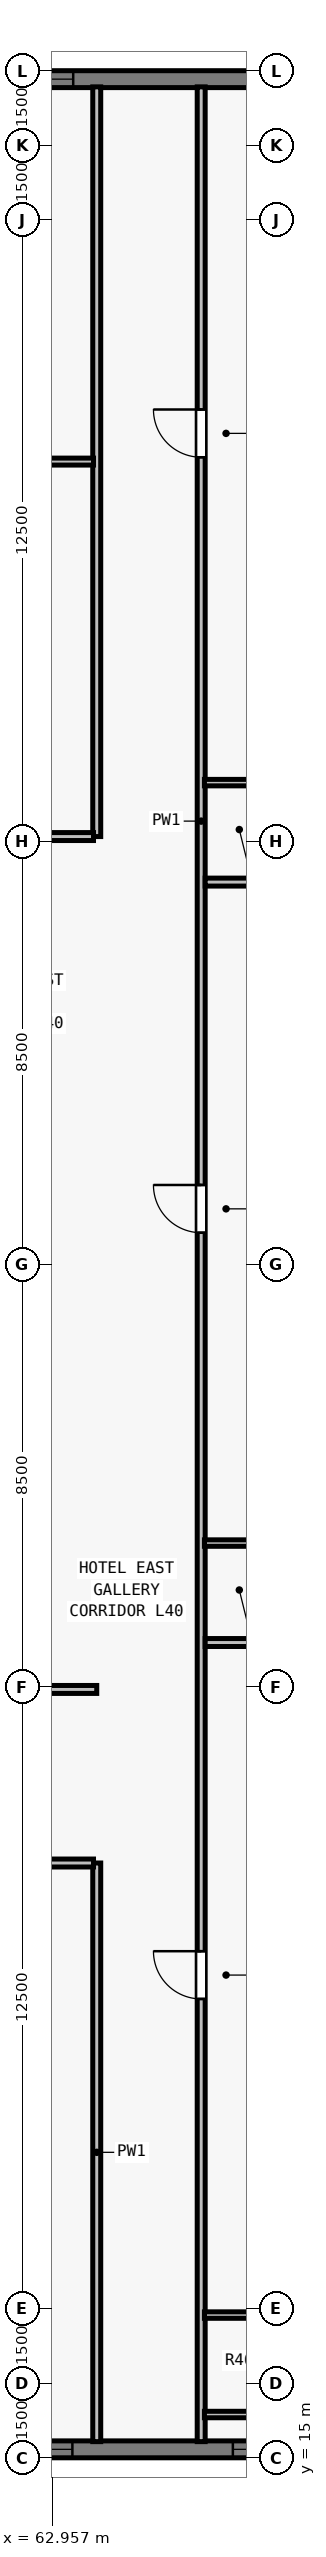
"""IFC4 building model, lengths in metres.
Left out: names, types, materials, properties, quantities, classifications, styles, units other than length and angle.
Written with IfcOpenShell. Run it as: python <this file> out.ifc"""

import sys

from ifc_helpers import new_model, si_unit, direction, frame, frame_2d, origin, place, context, subcontext, project, spatial, rectangle, extrude, element, fill, save


model = new_model("IFC4")
c1 = context("Model", 3, precision=1e-05, world=origin(), true_north=direction((0.0, 1.0)))
c2 = subcontext(c1, "Body", "Model", "MODEL_VIEW")
j1 = project(units=[si_unit("LENGTHUNIT", "METRE"), si_unit("PLANEANGLEUNIT", "RADIAN")], contexts=[c1])
p1 = place(None, origin())
s1 = spatial("IfcSite", under=j1, at=p1, CompositionType="ELEMENT")
p2 = place(p1, origin())
s2 = spatial("IfcBuilding", under=s1, at=p2, CompositionType="ELEMENT")
p3 = place(p2, frame((0.0, 0.0, 148.0)))
s3 = spatial("IfcBuildingStorey", under=s2, at=p3, CompositionType="ELEMENT", Elevation=148.0)
p4 = place(p3, frame((32.0, 62.83, 0.0), z_axis=(0.0, 0.0, 1.0), x_axis=(1.0, 0.0, 0.0)))
e1 = element("IfcWall", 1, at=p4, inside=s3, PredefinedType="SOLIDWALL", context=c2, shape_type="SweptSolid", body=[
    extrude(rectangle(XDim=39.682, YDim=0.34, at=frame_2d((19.841, 0.0))), origin(), (0.0, 0.0, 1.0), 3.28),
])
p5 = place(p4, frame((4.952, 0.0, 0.8)))
e2 = element("IfcOpeningElement", 2, at=p5, cuts=e1, PredefinedType="OPENING", context=c2, shape_type="SweptSolid", body=[
    extrude(rectangle(XDim=1.35, YDim=1.66, at=frame_2d((0.675, 0.83))), frame((0.0, 0.18, 0.0), z_axis=(0.0, -1.0, 0.0), x_axis=(1.0, 0.0, 0.0)), (0.0, 0.0, 1.0), 0.36),
])
p6 = place(p4, frame((12.059, 0.0, 0.8)))
e3 = element("IfcOpeningElement", 3, at=p6, cuts=e1, PredefinedType="OPENING", context=c2, shape_type="SweptSolid", body=[
    extrude(rectangle(XDim=1.35, YDim=1.66, at=frame_2d((0.675, 0.83))), frame((0.0, 0.18, 0.0), z_axis=(0.0, -1.0, 0.0), x_axis=(1.0, 0.0, 0.0)), (0.0, 0.0, 1.0), 0.36),
])
p7 = place(p4, frame((16.262, 0.0, 0.8)))
e4 = element("IfcOpeningElement", 4, at=p7, cuts=e1, PredefinedType="OPENING", context=c2, shape_type="SweptSolid", body=[
    extrude(rectangle(XDim=1.75, YDim=1.66, at=frame_2d((0.875, 0.83))), frame((0.0, 0.18, 0.0), z_axis=(0.0, -1.0, 0.0), x_axis=(1.0, 0.0, 0.0)), (0.0, 0.0, 1.0), 0.36),
])
p8 = place(p4, frame((18.316, 0.0, 0.8)))
e5 = element("IfcOpeningElement", 5, at=p8, cuts=e1, PredefinedType="OPENING", context=c2, shape_type="SweptSolid", body=[
    extrude(rectangle(XDim=1.35, YDim=1.66, at=frame_2d((0.675, 0.83))), frame((0.0, 0.18, 0.0), z_axis=(0.0, -1.0, 0.0), x_axis=(1.0, 0.0, 0.0)), (0.0, 0.0, 1.0), 0.36),
])
p9 = place(p4, frame((22.07, 0.0, 0.8)))
e6 = element("IfcOpeningElement", 6, at=p9, cuts=e1, PredefinedType="OPENING", context=c2, shape_type="SweptSolid", body=[
    extrude(rectangle(XDim=1.75, YDim=1.66, at=frame_2d((0.875, 0.83))), frame((0.0, 0.18, 0.0), z_axis=(0.0, -1.0, 0.0), x_axis=(1.0, 0.0, 0.0)), (0.0, 0.0, 1.0), 0.36),
])
p10 = place(p4, frame((26.273, 0.0, 0.8)))
e7 = element("IfcOpeningElement", 7, at=p10, cuts=e1, PredefinedType="OPENING", context=c2, shape_type="SweptSolid", body=[
    extrude(rectangle(XDim=1.35, YDim=1.66, at=frame_2d((0.675, 0.83))), frame((0.0, 0.18, 0.0), z_axis=(0.0, -1.0, 0.0), x_axis=(1.0, 0.0, 0.0)), (0.0, 0.0, 1.0), 0.36),
])
p11 = place(p4, frame((29.627, 0.0, 0.8)))
e8 = element("IfcOpeningElement", 8, at=p11, cuts=e1, PredefinedType="OPENING", context=c2, shape_type="SweptSolid", body=[
    extrude(rectangle(XDim=1.75, YDim=1.66, at=frame_2d((0.875, 0.83))), frame((0.0, 0.18, 0.0), z_axis=(0.0, -1.0, 0.0), x_axis=(1.0, 0.0, 0.0)), (0.0, 0.0, 1.0), 0.36),
])
p12 = place(p3, frame((72.0, 15.17, 0.0), z_axis=(0.0, 0.0, 1.0), x_axis=(-1.0, 0.0, 0.0)))
e9 = element("IfcWall", 9, at=p12, inside=s3, PredefinedType="SOLIDWALL", context=c2, shape_type="SweptSolid", body=[
    extrude(rectangle(XDim=25.082, YDim=0.34, at=frame_2d((12.541, 0.0))), origin(), (0.0, 0.0, 1.0), 3.28),
])
p13 = place(p12, frame((4.063, 0.0, 0.8)))
e10 = element("IfcOpeningElement", 10, at=p13, cuts=e9, PredefinedType="OPENING", context=c2, shape_type="SweptSolid", body=[
    extrude(rectangle(XDim=1.35, YDim=1.66, at=frame_2d((0.675, 0.83))), frame((0.0, 0.18, 0.0), z_axis=(0.0, -1.0, 0.0), x_axis=(1.0, 0.0, 0.0)), (0.0, 0.0, 1.0), 0.36),
])
p14 = place(p12, frame((8.64, 0.0, 0.8)))
e11 = element("IfcOpeningElement", 11, at=p14, cuts=e9, PredefinedType="OPENING", context=c2, shape_type="SweptSolid", body=[
    extrude(rectangle(XDim=1.75, YDim=1.66, at=frame_2d((0.875, 0.83))), frame((0.0, 0.18, 0.0), z_axis=(0.0, -1.0, 0.0), x_axis=(1.0, 0.0, 0.0)), (0.0, 0.0, 1.0), 0.36),
])
p15 = place(p12, frame((11.866, 0.0, 0.8)))
e12 = element("IfcOpeningElement", 12, at=p15, cuts=e9, PredefinedType="OPENING", context=c2, shape_type="SweptSolid", body=[
    extrude(rectangle(XDim=1.35, YDim=1.66, at=frame_2d((0.675, 0.83))), frame((0.0, 0.18, 0.0), z_axis=(0.0, -1.0, 0.0), x_axis=(1.0, 0.0, 0.0)), (0.0, 0.0, 1.0), 0.36),
])
p16 = place(p12, frame((15.992, 0.0, 0.8)))
e13 = element("IfcOpeningElement", 13, at=p16, cuts=e9, PredefinedType="OPENING", context=c2, shape_type="SweptSolid", body=[
    extrude(rectangle(XDim=1.75, YDim=1.66, at=frame_2d((0.875, 0.83))), frame((0.0, 0.18, 0.0), z_axis=(0.0, -1.0, 0.0), x_axis=(1.0, 0.0, 0.0)), (0.0, 0.0, 1.0), 0.36),
])
p17 = place(p3, frame((65.95, 15.325, 0.0), z_axis=(0.0, 0.0, 1.0), x_axis=(0.0, 1.0, 0.0)))
e14 = element("IfcWall", 14, at=p17, inside=s3, PredefinedType="PARTITIONING", context=c2, shape_type="SweptSolid", body=[
    extrude(rectangle(XDim=47.35, YDim=0.16, at=frame_2d((23.675, 0.0))), origin(), (0.0, 0.0, 1.0), 2.555),
])
p18 = place(p17, frame((8.902, 0.0, 0.0)))
e15 = element("IfcOpeningElement", 15, at=p18, cuts=e14, PredefinedType="OPENING", context=c2, shape_type="SweptSolid", body=[
    extrude(rectangle(XDim=0.96, YDim=2.15, at=frame_2d((0.48, 1.075))), frame((0.0, 0.09, 0.0), z_axis=(0.0, -1.0, 0.0), x_axis=(1.0, 0.0, 0.0)), (0.0, 0.0, 1.0), 0.18),
])
p19 = place(p17, frame((24.309, 0.0, 0.0)))
e16 = element("IfcOpeningElement", 16, at=p19, cuts=e14, PredefinedType="OPENING", context=c2, shape_type="SweptSolid", body=[
    extrude(rectangle(XDim=0.96, YDim=2.15, at=frame_2d((0.48, 1.075))), frame((0.0, 0.09, 0.0), z_axis=(0.0, -1.0, 0.0), x_axis=(1.0, 0.0, 0.0)), (0.0, 0.0, 1.0), 0.18),
])
p20 = place(p17, frame((39.902, 0.0, 0.0)))
e17 = element("IfcOpeningElement", 17, at=p20, cuts=e14, PredefinedType="OPENING", context=c2, shape_type="SweptSolid", body=[
    extrude(rectangle(XDim=0.96, YDim=2.15, at=frame_2d((0.48, 1.075))), frame((0.0, 0.09, 0.0), z_axis=(0.0, -1.0, 0.0), x_axis=(1.0, 0.0, 0.0)), (0.0, 0.0, 1.0), 0.18),
])
p21 = place(p3, frame((63.85, 15.325, 0.0), z_axis=(0.0, 0.0, 1.0), x_axis=(0.0, 1.0, 0.0)))
e18 = element("IfcWall", 18, at=p21, inside=s3, PredefinedType="PARTITIONING", context=c2, shape_type="SweptSolid", body=[
    extrude(rectangle(XDim=11.635, YDim=0.16, at=frame_2d((5.817, 0.0))), origin(), (0.0, 0.0, 1.0), 2.555),
])
p22 = place(p3, frame((63.85, 47.6, 0.0), z_axis=(0.0, 0.0, 1.0), x_axis=(0.0, 1.0, 0.0)))
e19 = element("IfcWall", 19, at=p22, inside=s3, PredefinedType="PARTITIONING", context=c2, shape_type="SweptSolid", body=[
    extrude(rectangle(XDim=15.075, YDim=0.16, at=frame_2d((7.538, 0.0))), origin(), (0.0, 0.0, 1.0), 2.555),
])
p23 = place(p3, frame((60.765, 30.45, 0.0), z_axis=(0.0, 0.0, 1.0), x_axis=(1.0, 0.0, 0.0)))
e20 = element("IfcWall", 20, at=p23, inside=s3, PredefinedType="PARTITIONING", context=c2, shape_type="SweptSolid", body=[
    extrude(rectangle(XDim=3.085, YDim=0.16, at=frame_2d((1.542, 0.0))), origin(), (0.0, 0.0, 1.0), 3.28),
])
p24 = place(p3, frame((60.765, 47.6, 0.0), z_axis=(0.0, 0.0, 1.0), x_axis=(1.0, 0.0, 0.0)))
e21 = element("IfcWall", 21, at=p24, inside=s3, PredefinedType="PARTITIONING", context=c2, shape_type="SweptSolid", body=[
    extrude(rectangle(XDim=3.02, YDim=0.16, at=frame_2d((1.51, 0.0))), origin(), (0.0, 0.0, 1.0), 3.28),
])
p25 = place(p3, frame((41.715, 26.96, 0.0), z_axis=(0.0, 0.0, 1.0), x_axis=(1.0, 0.0, 0.0)))
e22 = element("IfcWall", 22, at=p25, inside=s3, PredefinedType="PARTITIONING", context=c2, shape_type="SweptSolid", body=[
    extrude(rectangle(XDim=22.07, YDim=0.16, at=frame_2d((11.035, 0.0))), origin(), (0.0, 0.0, 1.0), 3.28),
])
p26 = place(p25, frame((6.15, 0.0, 0.0)))
e23 = element("IfcOpeningElement", 23, at=p26, cuts=e22, PredefinedType="OPENING", context=c2, shape_type="SweptSolid", body=[
    extrude(rectangle(XDim=0.96, YDim=2.15, at=frame_2d((0.48, 1.075))), frame((0.0, 0.09, 0.0), z_axis=(0.0, -1.0, 0.0), x_axis=(1.0, 0.0, 0.0)), (0.0, 0.0, 1.0), 0.18),
])
p27 = place(p25, frame((16.945, 0.0, 0.0)))
e24 = element("IfcOpeningElement", 24, at=p27, cuts=e22, PredefinedType="OPENING", context=c2, shape_type="SweptSolid", body=[
    extrude(rectangle(XDim=0.96, YDim=2.15, at=frame_2d((0.48, 1.075))), frame((0.0, 0.09, 0.0), z_axis=(0.0, -1.0, 0.0), x_axis=(1.0, 0.0, 0.0)), (0.0, 0.0, 1.0), 0.18),
])
p28 = place(p3, frame((41.715, 55.14, 0.0), z_axis=(0.0, 0.0, 1.0), x_axis=(1.0, 0.0, 0.0)))
e25 = element("IfcWall", 25, at=p28, inside=s3, PredefinedType="PARTITIONING", context=c2, shape_type="SweptSolid", body=[
    extrude(rectangle(XDim=22.07, YDim=0.14, at=frame_2d((11.035, 0.0))), origin(), (0.0, 0.0, 1.0), 3.28),
])
p29 = place(p28, frame((3.435, 0.0, 0.0)))
e26 = element("IfcOpeningElement", 26, at=p29, cuts=e25, PredefinedType="OPENING", context=c2, shape_type="SweptSolid", body=[
    extrude(rectangle(XDim=0.92, YDim=2.12, at=frame_2d((0.46, 1.06))), frame((0.0, 0.08, 0.0), z_axis=(0.0, -1.0, 0.0), x_axis=(1.0, 0.0, 0.0)), (0.0, 0.0, 1.0), 0.16),
])
p30 = place(p28, frame((14.435, 0.0, 0.0)))
e27 = element("IfcOpeningElement", 27, at=p30, cuts=e25, PredefinedType="OPENING", context=c2, shape_type="SweptSolid", body=[
    extrude(rectangle(XDim=0.92, YDim=2.12, at=frame_2d((0.46, 1.06))), frame((0.0, 0.08, 0.0), z_axis=(0.0, -1.0, 0.0), x_axis=(1.0, 0.0, 0.0)), (0.0, 0.0, 1.0), 0.16),
])
for number, where, z_axis, x_axis in (
    (28, (66.015, 15.87, 0.0), (0.0, 0.0, 1.0), (1.0, 0.0, 0.0)),
    (29, (66.015, 17.87, 0.0), (0.0, 0.0, 1.0), (1.0, 0.0, 0.0)),
):
    element("IfcWall", number, at=place(p3, frame(where, z_axis=z_axis, x_axis=x_axis)), inside=s3, PredefinedType="PLUMBINGWALL", context=c2, shape_type="SweptSolid", body=[
        extrude(rectangle(XDim=2.315, YDim=0.13, at=frame_2d((1.158, 0.0))), origin(), (0.0, 0.0, 1.0), 3.28),
    ])
p31 = place(p3, frame((66.03, 31.394, 0.0), z_axis=(0.0, 0.0, 1.0), x_axis=(1.0, 0.0, 0.0)))
e30 = element("IfcWall", 30, at=p31, inside=s3, PredefinedType="PARTITIONING", context=c2, shape_type="SweptSolid", body=[
    extrude(rectangle(XDim=9.645, YDim=0.16, at=frame_2d((4.823, 0.0))), origin(), (0.0, 0.0, 1.0), 3.28),
])
p32 = place(p3, frame((66.015, 33.394, 0.0), z_axis=(0.0, 0.0, 1.0), x_axis=(1.0, 0.0, 0.0)))
e31 = element("IfcWall", 31, at=p32, inside=s3, PredefinedType="PLUMBINGWALL", context=c2, shape_type="SweptSolid", body=[
    extrude(rectangle(XDim=2.315, YDim=0.13, at=frame_2d((1.158, 0.0))), origin(), (0.0, 0.0, 1.0), 3.28),
])
p33 = place(p3, frame((66.03, 46.685, 0.0), z_axis=(0.0, 0.0, 1.0), x_axis=(1.0, 0.0, 0.0)))
e32 = element("IfcWall", 32, at=p33, inside=s3, PredefinedType="PARTITIONING", context=c2, shape_type="SweptSolid", body=[
    extrude(rectangle(XDim=9.645, YDim=0.16, at=frame_2d((4.823, 0.0))), origin(), (0.0, 0.0, 1.0), 3.28),
])
p34 = place(p3, frame((66.015, 48.685, 0.0), z_axis=(0.0, 0.0, 1.0), x_axis=(1.0, 0.0, 0.0)))
e33 = element("IfcWall", 33, at=p34, inside=s3, PredefinedType="PLUMBINGWALL", context=c2, shape_type="SweptSolid", body=[
    extrude(rectangle(XDim=2.315, YDim=0.13, at=frame_2d((1.158, 0.0))), origin(), (0.0, 0.0, 1.0), 3.28),
])
p35 = place(p11, origin())
e34 = element("IfcWindow", 34, at=p35, inside=s3, PartitioningType="SINGLE_PANEL", PredefinedType="WINDOW", context=c2, shape_type="SweptSolid", body=[
    extrude(rectangle(XDim=1.75, YDim=1.66, at=frame_2d((0.875, 0.83))), frame((0.0, -0.05, 0.0), z_axis=(0.0, -1.0, 0.0), x_axis=(1.0, 0.0, 0.0)), (0.0, 0.0, 1.0), 0.06),
])
fill(e8, e34)
p36 = place(p13, origin())
e35 = element("IfcWindow", 35, at=p36, inside=s3, PartitioningType="SINGLE_PANEL", PredefinedType="WINDOW", context=c2, shape_type="SweptSolid", body=[
    extrude(rectangle(XDim=1.35, YDim=1.66, at=frame_2d((0.675, 0.83))), frame((0.0, -0.05, 0.0), z_axis=(0.0, -1.0, 0.0), x_axis=(1.0, 0.0, 0.0)), (0.0, 0.0, 1.0), 0.06),
])
fill(e10, e35)
p37 = place(p14, origin())
e36 = element("IfcWindow", 36, at=p37, inside=s3, PartitioningType="SINGLE_PANEL", PredefinedType="WINDOW", context=c2, shape_type="SweptSolid", body=[
    extrude(rectangle(XDim=1.75, YDim=1.66, at=frame_2d((0.875, 0.83))), frame((0.0, -0.05, 0.0), z_axis=(0.0, -1.0, 0.0), x_axis=(1.0, 0.0, 0.0)), (0.0, 0.0, 1.0), 0.06),
])
fill(e11, e36)
p38 = place(p18, origin())
e37 = element("IfcDoor", 37, at=p38, inside=s3, OperationType="SINGLE_SWING_RIGHT", PredefinedType="DOOR", context=c2, shape_type="SweptSolid", body=[
    extrude(rectangle(XDim=0.96, YDim=2.15, at=frame_2d((0.48, 1.075))), frame((0.0, 0.025, 0.0), z_axis=(0.0, -1.0, 0.0), x_axis=(1.0, 0.0, 0.0)), (0.0, 0.0, 1.0), 0.05),
])
fill(e15, e37)
p39 = place(p19, origin())
e38 = element("IfcDoor", 38, at=p39, inside=s3, OperationType="SINGLE_SWING_RIGHT", PredefinedType="DOOR", context=c2, shape_type="SweptSolid", body=[
    extrude(rectangle(XDim=0.96, YDim=2.15, at=frame_2d((0.48, 1.075))), frame((0.0, 0.025, 0.0), z_axis=(0.0, -1.0, 0.0), x_axis=(1.0, 0.0, 0.0)), (0.0, 0.0, 1.0), 0.05),
])
fill(e16, e38)
p40 = place(p20, origin())
e39 = element("IfcDoor", 39, at=p40, inside=s3, OperationType="SINGLE_SWING_RIGHT", PredefinedType="DOOR", context=c2, shape_type="SweptSolid", body=[
    extrude(rectangle(XDim=0.96, YDim=2.15, at=frame_2d((0.48, 1.075))), frame((0.0, 0.025, 0.0), z_axis=(0.0, -1.0, 0.0), x_axis=(1.0, 0.0, 0.0)), (0.0, 0.0, 1.0), 0.05),
])
fill(e17, e39)
save(model, sys.argv[1])
